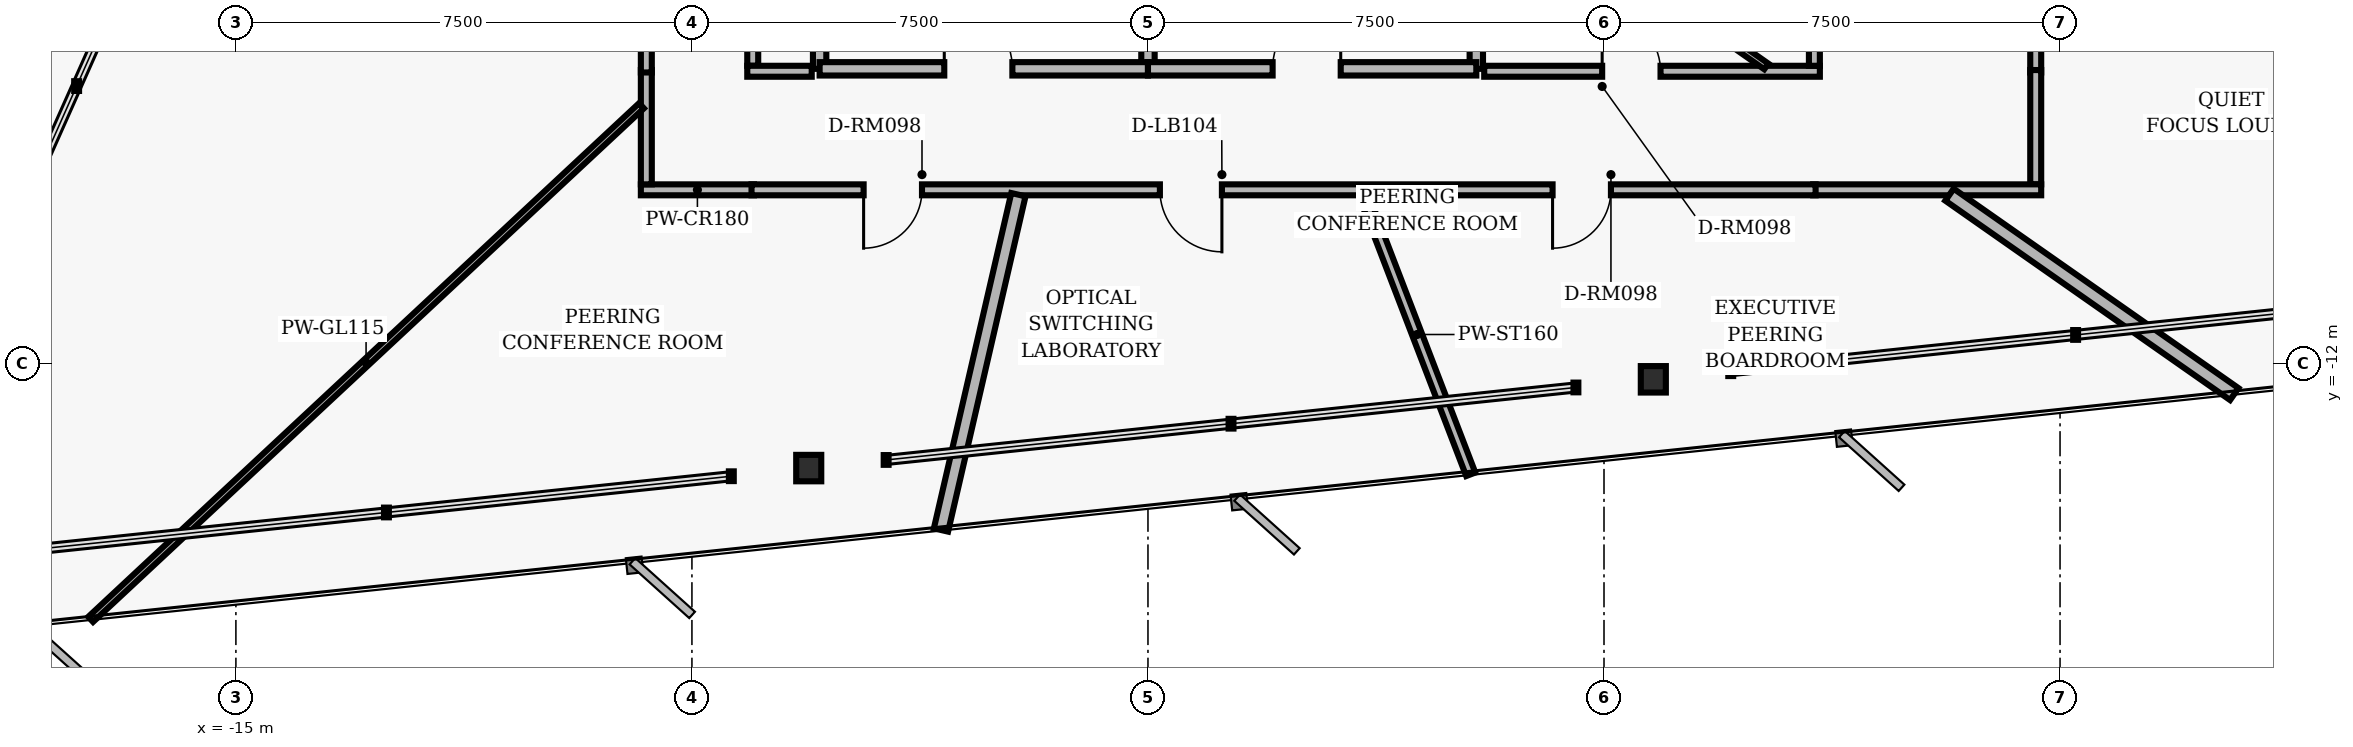
"""IFC4 building model, lengths in metres.
Left out: names, types, materials, properties, quantities, classifications, styles, units other than length and angle.
Written with IfcOpenShell. Run it as: python <this file> out.ifc"""

import sys

from ifc_helpers import new_model, si_unit, direction, frame, frame_2d, origin, origin_2d, place, context, subcontext, project, spatial, rectangle, i_section, extrude, element, fill, save


model = new_model("IFC4")
c1 = context("Model", 3, precision=1e-05, world=origin(), true_north=direction((0.0, 1.0)))
c2 = subcontext(c1, "Body", "Model", "MODEL_VIEW")
j1 = project(units=[si_unit("LENGTHUNIT", "METRE"), si_unit("PLANEANGLEUNIT", "RADIAN")], contexts=[c1])
p1 = place(None, origin())
s1 = spatial("IfcSite", under=j1, at=p1, CompositionType="ELEMENT")
p2 = place(p1, origin())
s2 = spatial("IfcBuilding", under=s1, at=p2, CompositionType="ELEMENT")
p3 = place(p2, frame((0.0, 0.0, 113.76)))
s3 = spatial("IfcBuildingStorey", under=s2, at=p3, CompositionType="ELEMENT", Elevation=113.76)
for number, where, z_axis, x_axis in (
    (1, (-5.579, -13.727, 0.0), (0.0, 0.0, 1.0), (1.0, 0.0, 0.0)),
    (2, (8.311, -12.267, 0.0), (0.0, 0.0, 1.0), (1.0, 0.0, 0.0)),
):
    element("IfcColumn", number, at=place(p3, frame(where, z_axis=z_axis, x_axis=x_axis)), inside=s3, PredefinedType="COLUMN", context=c2, shape_type="SweptSolid", body=[
        extrude(i_section(OverallWidth=0.412, OverallDepth=0.435, WebThickness=0.036, FlangeThickness=0.057, FilletRadius=0.022, at=origin_2d()), origin(), (0.0, 0.0, 1.0), 3.04),
    ])
for number, where, z_axis, x_axis in (
    (3, (-5.4, -7.16, 0.0), (0.0, 0.0, 1.0), (0.0, 1.0, 0.0)),
    (4, (5.4, -7.16, 0.0), (0.0, 0.0, 1.0), (0.0, 1.0, 0.0)),
):
    element("IfcWall", number, at=place(p3, frame(where, z_axis=z_axis, x_axis=x_axis)), inside=s3, PredefinedType="PARTITIONING", context=c2, shape_type="SweptSolid", body=[
        extrude(rectangle(XDim=2.71, YDim=0.22, at=frame_2d((1.355, 0.0))), origin(), (0.0, 0.0, 1.0), 2.763),
    ])
p4 = place(p3, frame((0.0, -7.16, 0.0), z_axis=(0.0, 0.0, 1.0), x_axis=(0.0, 1.0, 0.0)))
e5 = element("IfcWall", 5, at=p4, inside=s3, PredefinedType="PARTITIONING", context=c2, shape_type="SweptSolid", body=[
    extrude(rectangle(XDim=2.81, YDim=0.22, at=frame_2d((1.405, 0.0))), origin(), (0.0, 0.0, 1.0), 2.763),
])
p5 = place(p3, frame((-5.4, -7.16, 0.0), z_axis=(0.0, 0.0, 1.0), x_axis=(1.0, 0.0, 0.0)))
e6 = element("IfcWall", 6, at=p5, inside=s3, PredefinedType="PARTITIONING", context=c2, shape_type="SweptSolid", body=[
    extrude(rectangle(XDim=5.4, YDim=0.22, at=frame_2d((2.7, 0.0))), origin(), (0.0, 0.0, 1.0), 2.33),
])
p6 = place(p5, frame((2.05, 0.0, 0.0)))
e7 = element("IfcOpeningElement", 7, at=p6, cuts=e6, PredefinedType="OPENING", context=c2, shape_type="SweptSolid", body=[
    extrude(rectangle(XDim=1.12, YDim=2.02, at=frame_2d((0.56, 1.01))), frame((0.0, 0.12, 0.0), z_axis=(0.0, -1.0, 0.0), x_axis=(1.0, 0.0, 0.0)), (0.0, 0.0, 1.0), 0.24),
])
p7 = place(p3, frame((0.0, -7.16, 0.0), z_axis=(0.0, 0.0, 1.0), x_axis=(1.0, 0.0, 0.0)))
e8 = element("IfcWall", 8, at=p7, inside=s3, PredefinedType="PARTITIONING", context=c2, shape_type="SweptSolid", body=[
    extrude(rectangle(XDim=5.4, YDim=0.22, at=frame_2d((2.7, 0.0))), origin(), (0.0, 0.0, 1.0), 2.33),
])
p8 = place(p7, frame((2.05, 0.0, 0.0)))
e9 = element("IfcOpeningElement", 9, at=p8, cuts=e8, PredefinedType="OPENING", context=c2, shape_type="SweptSolid", body=[
    extrude(rectangle(XDim=1.12, YDim=2.02, at=frame_2d((0.56, 1.01))), frame((0.0, 0.12, 0.0), z_axis=(0.0, -1.0, 0.0), x_axis=(1.0, 0.0, 0.0)), (0.0, 0.0, 1.0), 0.24),
])
p9 = place(p3, frame((-6.48, -9.15, 0.0), z_axis=(0.0, 0.0, 1.0), x_axis=(-1.0, 0.0, 0.0)))
e10 = element("IfcWall", 10, at=p9, inside=s3, PredefinedType="PARTITIONING", context=c2, shape_type="SweptSolid", body=[
    extrude(rectangle(XDim=1.86, YDim=0.18, at=frame_2d((0.93, 0.0))), origin(), (0.0, 0.0, 1.0), 2.33),
])
p10 = place(p3, frame((-8.25, -9.06, 0.0), z_axis=(0.0, 0.0, 1.0), x_axis=(0.0, 1.0, 0.0)))
e11 = element("IfcWall", 11, at=p10, inside=s3, PredefinedType="PARTITIONING", context=c2, shape_type="SweptSolid", body=[
    extrude(rectangle(XDim=1.88, YDim=0.18, at=frame_2d((0.94, 0.0))), origin(), (0.0, 0.0, 1.0), 2.763),
])
p11 = place(p3, frame((-8.25, -7.22, 0.0), z_axis=(0.0, 0.0, 1.0), x_axis=(0.0, 1.0, 0.0)))
e12 = element("IfcWall", 12, at=p11, inside=s3, PredefinedType="PARTITIONING", context=c2, shape_type="SweptSolid", body=[
    extrude(rectangle(XDim=14.44, YDim=0.18, at=frame_2d((7.22, 0.0))), origin(), (0.0, 0.0, 1.0), 2.33),
])
p12 = place(p11, frame((6.665, 0.0, 0.0)))
e13 = element("IfcOpeningElement", 13, at=p12, cuts=e12, PredefinedType="OPENING", context=c2, shape_type="SweptSolid", body=[
    extrude(rectangle(XDim=0.96, YDim=2.02, at=frame_2d((0.48, 1.01))), frame((0.0, 0.1, 0.0), z_axis=(0.0, -1.0, 0.0), x_axis=(1.0, 0.0, 0.0)), (0.0, 0.0, 1.0), 0.2),
])
p13 = place(p11, frame((2.525, 0.0, 0.0)))
e14 = element("IfcOpeningElement", 14, at=p13, cuts=e12, PredefinedType="OPENING", context=c2, shape_type="SweptSolid", body=[
    extrude(rectangle(XDim=0.96, YDim=2.02, at=frame_2d((0.48, 1.01))), frame((0.0, 0.1, 0.0), z_axis=(0.0, -1.0, 0.0), x_axis=(1.0, 0.0, 0.0)), (0.0, 0.0, 1.0), 0.2),
])
p14 = place(p11, frame((10.88, 0.0, 0.0)))
e15 = element("IfcOpeningElement", 15, at=p14, cuts=e12, PredefinedType="OPENING", context=c2, shape_type="SweptSolid", body=[
    extrude(rectangle(XDim=0.96, YDim=2.02, at=frame_2d((0.48, 1.01))), frame((0.0, 0.1, 0.0), z_axis=(0.0, -1.0, 0.0), x_axis=(1.0, 0.0, 0.0)), (0.0, 0.0, 1.0), 0.2),
])
p15 = place(p3, frame((14.6, 3.018, 0.0), z_axis=(0.0, 0.0, 1.0), x_axis=(0.0, -1.0, 0.0)))
e16 = element("IfcWall", 16, at=p15, inside=s3, PredefinedType="PARTITIONING", context=c2, shape_type="SweptSolid", body=[
    extrude(rectangle(XDim=10.238, YDim=0.18, at=frame_2d((5.119, 0.0))), origin(), (0.0, 0.0, 1.0), 2.763),
])
p16 = place(p15, frame((6.146, 0.0, 0.0)))
e17 = element("IfcOpeningElement", 17, at=p16, cuts=e16, PredefinedType="OPENING", context=c2, shape_type="SweptSolid", body=[
    extrude(rectangle(XDim=0.96, YDim=2.02, at=frame_2d((0.48, 1.01))), frame((0.0, 0.1, 0.0), z_axis=(0.0, -1.0, 0.0), x_axis=(1.0, 0.0, 0.0)), (0.0, 0.0, 1.0), 0.2),
])
p17 = place(p3, frame((14.6, -7.18, 0.0), z_axis=(0.0, 0.0, 1.0), x_axis=(0.0, -1.0, 0.0)))
e18 = element("IfcWall", 18, at=p17, inside=s3, PredefinedType="PARTITIONING", context=c2, shape_type="SweptSolid", body=[
    extrude(rectangle(XDim=1.88, YDim=0.18, at=frame_2d((0.94, 0.0))), origin(), (0.0, 0.0, 1.0), 2.763),
])
p18 = place(p3, frame((14.69, -9.15, 0.0), z_axis=(0.0, 0.0, 1.0), x_axis=(-1.0, 0.0, 0.0)))
e19 = element("IfcWall", 19, at=p18, inside=s3, PredefinedType="PARTITIONING", context=c2, shape_type="SweptSolid", body=[
    extrude(rectangle(XDim=3.75, YDim=0.18, at=frame_2d((1.875, 0.0))), origin(), (0.0, 0.0, 1.0), 2.33),
])
p19 = place(p3, frame((10.98, -9.15, 0.0), z_axis=(0.0, 0.0, 1.0), x_axis=(-1.0, 0.0, 0.0)))
e20 = element("IfcWall", 20, at=p19, inside=s3, PredefinedType="PARTITIONING", context=c2, shape_type="SweptSolid", body=[
    extrude(rectangle(XDim=17.5, YDim=0.18, at=frame_2d((8.75, 0.0))), origin(), (0.0, 0.0, 1.0), 2.33),
])
p20 = place(p19, frame((14.696, 0.0, 0.0)))
e21 = element("IfcOpeningElement", 21, at=p20, cuts=e20, PredefinedType="OPENING", context=c2, shape_type="SweptSolid", body=[
    extrude(rectangle(XDim=0.96, YDim=2.02, at=frame_2d((0.48, 1.01))), frame((0.0, 0.1, 0.0), z_axis=(0.0, -1.0, 0.0), x_axis=(1.0, 0.0, 0.0)), (0.0, 0.0, 1.0), 0.2),
])
p21 = place(p19, frame((9.764, 0.0, 0.0)))
e22 = element("IfcOpeningElement", 22, at=p21, cuts=e20, PredefinedType="OPENING", context=c2, shape_type="SweptSolid", body=[
    extrude(rectangle(XDim=1.02, YDim=2.02, at=frame_2d((0.51, 1.01))), frame((0.0, 0.1, 0.0), z_axis=(0.0, -1.0, 0.0), x_axis=(1.0, 0.0, 0.0)), (0.0, 0.0, 1.0), 0.2),
])
p22 = place(p19, frame((3.366, 0.0, 0.0)))
e23 = element("IfcOpeningElement", 23, at=p22, cuts=e20, PredefinedType="OPENING", context=c2, shape_type="SweptSolid", body=[
    extrude(rectangle(XDim=0.96, YDim=2.02, at=frame_2d((0.48, 1.01))), frame((0.0, 0.1, 0.0), z_axis=(0.0, -1.0, 0.0), x_axis=(1.0, 0.0, 0.0)), (0.0, 0.0, 1.0), 0.2),
])
p23 = place(p3, frame((5.53, -7.2, 0.0), z_axis=(0.0, 0.0, 1.0), x_axis=(1.0, 0.0, 0.0)))
e24 = element("IfcWall", 24, at=p23, inside=s3, PredefinedType="PARTITIONING", context=c2, shape_type="SweptSolid", body=[
    extrude(rectangle(XDim=5.52, YDim=0.18, at=frame_2d((2.76, 0.0))), origin(), (0.0, 0.0, 1.0), 2.33),
])
p24 = place(p23, frame((1.94, 0.0, 0.0)))
e25 = element("IfcOpeningElement", 25, at=p24, cuts=e24, PredefinedType="OPENING", context=c2, shape_type="SweptSolid", body=[
    extrude(rectangle(XDim=0.96, YDim=2.02, at=frame_2d((0.48, 1.01))), frame((0.0, 0.1, 0.0), z_axis=(0.0, -1.0, 0.0), x_axis=(1.0, 0.0, 0.0)), (0.0, 0.0, 1.0), 0.2),
])
p25 = place(p3, frame((10.96, -7.11, 0.0), z_axis=(0.0, 0.0, 1.0), x_axis=(0.0, 1.0, 0.0)))
e26 = element("IfcWall", 26, at=p25, inside=s3, PredefinedType="PARTITIONING", context=c2, shape_type="SweptSolid", body=[
    extrude(rectangle(XDim=3.271, YDim=0.18, at=frame_2d((1.635, 0.0))), origin(), (0.0, 0.0, 1.0), 2.763),
])
p26 = place(p3, frame((-6.5, -4.88, 0.0), z_axis=(0.0, 0.0, 1.0), x_axis=(0.0, -1.0, 0.0)))
e27 = element("IfcWall", 27, at=p26, inside=s3, PredefinedType="PARTITIONING", context=c2, shape_type="SweptSolid", body=[
    extrude(rectangle(XDim=2.23, YDim=0.18, at=frame_2d((1.115, 0.0))), origin(), (0.0, 0.0, 1.0), 2.763),
])
p27 = place(p3, frame((-6.59, -7.2, 0.0), z_axis=(0.0, 0.0, 1.0), x_axis=(1.0, 0.0, 0.0)))
e28 = element("IfcWall", 28, at=p27, inside=s3, PredefinedType="PARTITIONING", context=c2, shape_type="SweptSolid", body=[
    extrude(rectangle(XDim=1.06, YDim=0.18, at=frame_2d((0.53, 0.0))), origin(), (0.0, 0.0, 1.0), 2.33),
])
p28 = place(p3, frame((-8.33, -7.768, 0.0), z_axis=(0.0, 0.0, 1.0), x_axis=(-0.731355419522, -0.681996517833, 0.0)))
e29 = element("IfcWall", 29, at=p28, inside=s3, PredefinedType="MOVABLE", context=c2, shape_type="SweptSolid", body=[
    extrude(rectangle(XDim=12.385, YDim=0.115, at=frame_2d((6.193, 0.0))), origin(), (0.0, 0.0, 1.0), 2.763),
])
p29 = place(p3, frame((-2.131, -9.23, 0.0), z_axis=(0.0, 0.0, 1.0), x_axis=(-0.224947713915, -0.974370835978, 0.0)))
e30 = element("IfcWall", 30, at=p29, inside=s3, PredefinedType="PARTITIONING", context=c2, shape_type="SweptSolid", body=[
    extrude(rectangle(XDim=5.66, YDim=0.24, at=frame_2d((2.83, 0.0))), origin(), (0.0, 0.0, 1.0), 2.763),
])
p30 = place(p3, frame((3.543, -9.23, 0.0), z_axis=(0.0, 0.0, 1.0), x_axis=(0.358357985043, -0.93358425145, 0.0)))
e31 = element("IfcWall", 31, at=p30, inside=s3, PredefinedType="PARTITIONING", context=c2, shape_type="SweptSolid", body=[
    extrude(rectangle(XDim=4.926, YDim=0.16, at=frame_2d((2.463, 0.0))), origin(), (0.0, 0.0, 1.0), 2.763),
])
p31 = place(p3, frame((7.012, -4.91, 0.0), z_axis=(0.0, 0.0, 1.0), x_axis=(0.819130700295, -0.573606917526, 0.0)))
e32 = element("IfcWall", 32, at=p31, inside=s3, PredefinedType="MOVABLE", context=c2, shape_type="SweptSolid", body=[
    extrude(rectangle(XDim=3.853, YDim=0.115, at=frame_2d((1.927, 0.0))), origin(), (0.0, 0.0, 1.0), 2.763),
])
p32 = place(p3, frame((13.182, -9.23, 0.0), z_axis=(0.0, 0.0, 1.0), x_axis=(0.819133610169, -0.573602762102, 0.0)))
e33 = element("IfcWall", 33, at=p32, inside=s3, PredefinedType="PARTITIONING", context=c2, shape_type="SweptSolid", body=[
    extrude(rectangle(XDim=5.718, YDim=0.24, at=frame_2d((2.859, 0.0))), origin(), (0.0, 0.0, 1.0), 2.763),
])
p33 = place(p6, origin())
e34 = element("IfcDoor", 34, at=p33, inside=s3, OperationType="SINGLE_SWING_LEFT", PredefinedType="DOOR", context=c2, shape_type="SweptSolid", body=[
    extrude(rectangle(XDim=1.12, YDim=2.02, at=frame_2d((0.56, 1.01))), frame((0.0, 0.025, 0.0), z_axis=(0.0, -1.0, 0.0), x_axis=(1.0, 0.0, 0.0)), (0.0, 0.0, 1.0), 0.05),
])
fill(e7, e34)
p34 = place(p8, origin())
e35 = element("IfcDoor", 35, at=p34, inside=s3, OperationType="SINGLE_SWING_RIGHT", PredefinedType="DOOR", context=c2, shape_type="SweptSolid", body=[
    extrude(rectangle(XDim=1.12, YDim=2.02, at=frame_2d((0.56, 1.01))), frame((0.0, 0.025, 0.0), z_axis=(0.0, -1.0, 0.0), x_axis=(1.0, 0.0, 0.0)), (0.0, 0.0, 1.0), 0.05),
])
fill(e9, e35)
p35 = place(p20, origin())
e36 = element("IfcDoor", 36, at=p35, inside=s3, OperationType="SINGLE_SWING_RIGHT", PredefinedType="DOOR", context=c2, shape_type="SweptSolid", body=[
    extrude(rectangle(XDim=0.96, YDim=2.02, at=frame_2d((0.48, 1.01))), frame((0.0, 0.025, 0.0), z_axis=(0.0, -1.0, 0.0), x_axis=(1.0, 0.0, 0.0)), (0.0, 0.0, 1.0), 0.05),
])
fill(e21, e36)
p36 = place(p21, origin())
e37 = element("IfcDoor", 37, at=p36, inside=s3, OperationType="SINGLE_SWING_LEFT", PredefinedType="DOOR", context=c2, shape_type="SweptSolid", body=[
    extrude(rectangle(XDim=1.02, YDim=2.02, at=frame_2d((0.51, 1.01))), frame((0.0, 0.025, 0.0), z_axis=(0.0, -1.0, 0.0), x_axis=(1.0, 0.0, 0.0)), (0.0, 0.0, 1.0), 0.05),
])
fill(e22, e37)
p37 = place(p22, origin())
e38 = element("IfcDoor", 38, at=p37, inside=s3, OperationType="SINGLE_SWING_RIGHT", PredefinedType="DOOR", context=c2, shape_type="SweptSolid", body=[
    extrude(rectangle(XDim=0.96, YDim=2.02, at=frame_2d((0.48, 1.01))), frame((0.0, 0.025, 0.0), z_axis=(0.0, -1.0, 0.0), x_axis=(1.0, 0.0, 0.0)), (0.0, 0.0, 1.0), 0.05),
])
fill(e23, e38)
p38 = place(p24, origin())
e39 = element("IfcDoor", 39, at=p38, inside=s3, OperationType="SINGLE_SWING_LEFT", PredefinedType="DOOR", context=c2, shape_type="SweptSolid", body=[
    extrude(rectangle(XDim=0.96, YDim=2.02, at=frame_2d((0.48, 1.01))), frame((0.0, 0.025, 0.0), z_axis=(0.0, -1.0, 0.0), x_axis=(1.0, 0.0, 0.0)), (0.0, 0.0, 1.0), 0.05),
])
fill(e25, e39)
save(model, sys.argv[1])
